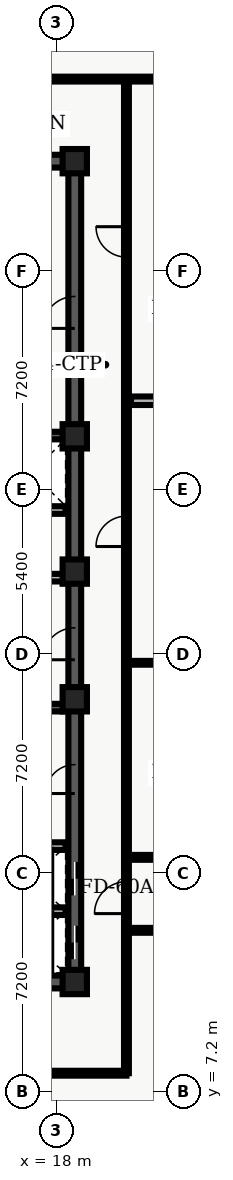
"""IFC4 building model, lengths in metres.
Left out: names, types, materials, properties, quantities, classifications, styles, units other than length and angle.
Written with IfcOpenShell. Run it as: python <this file> out.ifc"""

import sys

from ifc_helpers import new_model, entity, si_unit, converted_unit, direction, frame, origin_with_axes, origin_2d_with_axis, place, context, subcontext, project, spatial, polyline, rectangle, outline, extrude, element, fill, save


model = new_model("IFC4")
c1 = context("Model", 3, precision=1e-05, world=origin_with_axes(), true_north=direction((0.0, 1.0)))
c2 = subcontext(c1, "Body", "Model", "MODEL_VIEW")
j1 = project(units=[si_unit("LENGTHUNIT", "METRE"), converted_unit("PLANEANGLEUNIT", "DEGREE", entity("IfcPlaneAngleMeasure", 0.017), si_unit("PLANEANGLEUNIT", "RADIAN"), dimensions=[0, 0, 0, 0, 0, 0, 0])], contexts=[c1])
p1 = place(None, origin_with_axes())
s1 = spatial("IfcSite", under=j1, at=p1, CompositionType="ELEMENT")
p2 = place(p1, origin_with_axes())
s2 = spatial("IfcBuilding", under=s1, at=p2, CompositionType="ELEMENT")
p3 = place(p2, frame((0.0, 0.0, 260.7), z_axis=(0.0, 0.0, 1.0), x_axis=(1.0, 0.0, 0.0)))
s3 = spatial("IfcBuildingStorey", under=s2, at=p3, CompositionType="ELEMENT", Elevation=260.7)
p4 = place(p3, frame((11.4, 10.8, 0.0), z_axis=(0.0, 0.0, 1.0), x_axis=(1.0, 0.0, 0.0)))
e1 = element("IfcWall", 1, at=p4, inside=s3, PredefinedType="SHEAR", context=c2, shape_type="SweptSolid", body=[
    extrude(outline(polyline([(0.0, -0.21), (7.2, -0.21), (7.2, 0.21), (0.0, 0.21), (0.0, -0.21)])), origin_with_axes(), (0.0, 0.0, 1.0), 3.66),
])
p5 = place(p4, frame((2.625, 0.0, 0.0), z_axis=(0.0, 0.0, 1.0), x_axis=(1.0, 0.0, 0.0)))
e2 = element("IfcOpeningElement", 2, at=p5, cuts=e1, PredefinedType="OPENING", context=c2, shape_type="SweptSolid", body=[
    extrude(rectangle(XDim=1.05, YDim=0.44, at=origin_2d_with_axis()), origin_with_axes(), (0.0, 0.0, 1.0), 2.15),
])
p6 = place(p3, frame((11.4, 37.8, 0.0), z_axis=(0.0, 0.0, 1.0), x_axis=(1.0, 0.0, 0.0)))
e3 = element("IfcWall", 3, at=p6, inside=s3, PredefinedType="SHEAR", context=c2, shape_type="SweptSolid", body=[
    extrude(outline(polyline([(0.0, -0.21), (7.2, -0.21), (7.2, 0.21), (0.0, 0.21), (0.0, -0.21)])), origin_with_axes(), (0.0, 0.0, 1.0), 3.66),
])
p7 = place(p6, frame((2.625, 0.0, 0.0), z_axis=(0.0, 0.0, 1.0), x_axis=(1.0, 0.0, 0.0)))
e4 = element("IfcOpeningElement", 4, at=p7, cuts=e3, PredefinedType="OPENING", context=c2, shape_type="SweptSolid", body=[
    extrude(rectangle(XDim=1.05, YDim=0.44, at=origin_2d_with_axis()), origin_with_axes(), (0.0, 0.0, 1.0), 2.15),
])
p8 = place(p3, frame((18.6, 10.8, 0.0), z_axis=(0.0, 0.0, 1.0), x_axis=(0.0, 1.0, 0.0)))
e5 = element("IfcWall", 5, at=p8, inside=s3, PredefinedType="SHEAR", context=c2, shape_type="SweptSolid", body=[
    extrude(outline(polyline([(0.0, -0.21), (13.5, -0.21), (13.5, 0.21), (0.0, 0.21), (0.0, -0.21)])), origin_with_axes(), (0.0, 0.0, 1.0), 3.66),
])
p9 = place(p8, frame((1.3, 0.0, 0.0), z_axis=(0.0, 0.0, 1.0), x_axis=(1.0, 0.0, 0.0)))
e6 = element("IfcOpeningElement", 6, at=p9, cuts=e5, PredefinedType="OPENING", context=c2, shape_type="SweptSolid", body=[
    extrude(rectangle(XDim=1.1, YDim=0.44, at=origin_2d_with_axis()), origin_with_axes(), (0.0, 0.0, 1.0), 2.15),
])
p10 = place(p8, frame((3.4, 0.0, 0.0), z_axis=(0.0, 0.0, 1.0), x_axis=(1.0, 0.0, 0.0)))
e7 = element("IfcOpeningElement", 7, at=p10, cuts=e5, PredefinedType="OPENING", context=c2, shape_type="SweptSolid", body=[
    extrude(rectangle(XDim=1.1, YDim=0.44, at=origin_2d_with_axis()), origin_with_axes(), (0.0, 0.0, 1.0), 2.15),
])
p11 = place(p8, frame((11.125, 0.0, 0.0), z_axis=(0.0, 0.0, 1.0), x_axis=(1.0, 0.0, 0.0)))
e8 = element("IfcOpeningElement", 8, at=p11, cuts=e5, PredefinedType="OPENING", context=c2, shape_type="SweptSolid", body=[
    extrude(rectangle(XDim=1.05, YDim=0.44, at=origin_2d_with_axis()), origin_with_axes(), (0.0, 0.0, 1.0), 2.15),
])
p12 = place(p8, frame((6.675, 0.0, 0.0), z_axis=(0.0, 0.0, 1.0), x_axis=(1.0, 0.0, 0.0)))
e9 = element("IfcOpeningElement", 9, at=p12, cuts=e5, PredefinedType="OPENING", context=c2, shape_type="SweptSolid", body=[
    extrude(rectangle(XDim=0.95, YDim=0.44, at=origin_2d_with_axis()), origin_with_axes(), (0.0, 0.0, 1.0), 2.15),
])
p13 = place(p3, frame((18.6, 24.3, 0.0), z_axis=(0.0, 0.0, 1.0), x_axis=(0.0, 1.0, 0.0)))
e10 = element("IfcWall", 10, at=p13, inside=s3, PredefinedType="SHEAR", context=c2, shape_type="SweptSolid", body=[
    extrude(outline(polyline([(0.0, -0.21), (13.5, -0.21), (13.5, 0.21), (0.0, 0.21), (0.0, -0.21)])), origin_with_axes(), (0.0, 0.0, 1.0), 3.66),
])
p14 = place(p13, frame((8.525, 0.0, 0.0), z_axis=(0.0, 0.0, 1.0), x_axis=(1.0, 0.0, 0.0)))
e11 = element("IfcOpeningElement", 11, at=p14, cuts=e10, PredefinedType="OPENING", context=c2, shape_type="SweptSolid", body=[
    extrude(rectangle(XDim=1.05, YDim=0.44, at=origin_2d_with_axis()), origin_with_axes(), (0.0, 0.0, 1.0), 2.15),
])
for number, where, z_axis, x_axis in (
    (12, (11.61, 19.825, 0.0), (0.0, 0.0, 1.0), (1.0, 0.0, 0.0)),
    (13, (11.61, 28.775, 0.0), (0.0, 0.0, 1.0), (1.0, 0.0, 0.0)),
):
    element("IfcWall", number, at=place(p3, frame(where, z_axis=z_axis, x_axis=x_axis)), inside=s3, PredefinedType="SHEAR", context=c2, shape_type="SweptSolid", body=[
        extrude(outline(polyline([(0.0, -0.125), (6.78, -0.125), (6.78, 0.125), (0.0, 0.125), (0.0, -0.125)])), origin_with_axes(), (0.0, 0.0, 1.0), 3.66),
    ])
p15 = place(p3, frame((11.7, 24.1, 0.0), z_axis=(0.0, 0.0, 1.0), x_axis=(1.0, 0.0, 0.0)))
e14 = element("IfcWall", 14, at=p15, inside=s3, PredefinedType="SOLIDWALL", context=c2, shape_type="SweptSolid", body=[
    extrude(outline(polyline([(0.0, -0.125), (6.6, -0.125), (6.6, 0.125), (0.0, 0.125), (0.0, -0.125)])), origin_with_axes(), (0.0, 0.0, 1.0), 2.7),
])
p16 = place(p15, frame((3.75, 0.0, 0.0), z_axis=(0.0, 0.0, 1.0), x_axis=(1.0, 0.0, 0.0)))
e15 = element("IfcOpeningElement", 15, at=p16, cuts=e14, PredefinedType="OPENING", context=c2, shape_type="SweptSolid", body=[
    extrude(rectangle(XDim=0.9, YDim=0.27, at=origin_2d_with_axis()), origin_with_axes(), (0.0, 0.0, 1.0), 2.15),
])
p17 = place(p3, frame((11.7, 26.325, 0.0), z_axis=(0.0, 0.0, 1.0), x_axis=(1.0, 0.0, 0.0)))
e16 = element("IfcWall", 16, at=p17, inside=s3, PredefinedType="SOLIDWALL", context=c2, shape_type="SweptSolid", body=[
    extrude(outline(polyline([(0.0, -0.125), (6.6, -0.125), (6.6, 0.125), (0.0, 0.125), (0.0, -0.125)])), origin_with_axes(), (0.0, 0.0, 1.0), 2.7),
])
p18 = place(p17, frame((3.5, 0.0, 0.0), z_axis=(0.0, 0.0, 1.0), x_axis=(1.0, 0.0, 0.0)))
e17 = element("IfcOpeningElement", 17, at=p18, cuts=e16, PredefinedType="OPENING", context=c2, shape_type="SweptSolid", body=[
    extrude(rectangle(XDim=0.9, YDim=0.27, at=origin_2d_with_axis()), origin_with_axes(), (0.0, 0.0, 1.0), 2.15),
])
for number, where, z_axis, x_axis in (
    (18, (18.6, 10.8, 0.0), (0.0, 0.0, 1.0), (1.0, 0.0, 0.0)),
    (19, (18.6, 20.1, 0.0), (0.0, 0.0, 1.0), (1.0, 0.0, 0.0)),
    (20, (18.6, 24.3, 0.0), (0.0, 0.0, 1.0), (1.0, 0.0, 0.0)),
    (21, (18.6, 28.75, 0.0), (0.0, 0.0, 1.0), (1.0, 0.0, 0.0)),
    (22, (18.6, 37.8, 0.0), (0.0, 0.0, 1.0), (1.0, 0.0, 0.0)),
):
    element("IfcColumn", number, at=place(p3, frame(where, z_axis=z_axis, x_axis=x_axis)), inside=s3, PredefinedType="COLUMN", context=c2, shape_type="SweptSolid", body=[
        extrude(rectangle(XDim=0.8, YDim=0.8, at=origin_2d_with_axis()), origin_with_axes(), (0.0, 0.0, 1.0), 3.9),
    ])
for number, where, z_axis, x_axis in (
    (23, (15.84, 13.13, 0.0), (0.0, 0.0, 1.0), (1.0, 0.0, 0.0)),
    (24, (15.84, 15.27, 0.0), (0.0, 0.0, 1.0), (1.0, 0.0, 0.0)),
):
    element("IfcWall", number, at=place(p3, frame(where, z_axis=z_axis, x_axis=x_axis)), inside=s3, PredefinedType="SOLIDWALL", context=c2, shape_type="SweptSolid", body=[
        extrude(outline(polyline([(0.0, -0.125), (2.46, -0.125), (2.46, 0.125), (0.0, 0.125), (0.0, -0.125)])), origin_with_axes(), (0.0, 0.0, 1.0), 2.7),
    ])
p19 = place(p3, frame((8.135, 7.8, 0.0), z_axis=(0.0, 0.0, 1.0), x_axis=(1.0, 0.0, 0.0)))
e25 = element("IfcWall", 25, at=p19, inside=s3, PredefinedType="PARTITIONING", context=c2, shape_type="SweptSolid", body=[
    extrude(outline(polyline([(0.0, -0.08), (12.165, -0.08), (12.165, 0.08), (0.0, 0.08), (0.0, -0.08)])), origin_with_axes(), (0.0, 0.0, 1.0), 2.7),
])
p20 = place(p19, frame((3.979, 0.0, 0.0), z_axis=(0.0, 0.0, 1.0), x_axis=(1.0, 0.0, 0.0)))
e26 = element("IfcOpeningElement", 26, at=p20, cuts=e25, PredefinedType="OPENING", context=c2, shape_type="SweptSolid", body=[
    extrude(rectangle(XDim=1.0, YDim=0.18, at=origin_2d_with_axis()), origin_with_axes(), (0.0, 0.0, 1.0), 2.15),
])
p21 = place(p19, frame((8.778, 0.0, 0.0), z_axis=(0.0, 0.0, 1.0), x_axis=(1.0, 0.0, 0.0)))
e27 = element("IfcOpeningElement", 27, at=p21, cuts=e25, PredefinedType="OPENING", context=c2, shape_type="SweptSolid", body=[
    extrude(rectangle(XDim=1.0, YDim=0.18, at=origin_2d_with_axis()), origin_with_axes(), (0.0, 0.0, 1.0), 2.15),
])
p22 = place(p3, frame((8.135, 40.5, 0.0), z_axis=(0.0, 0.0, 1.0), x_axis=(1.0, 0.0, 0.0)))
e28 = element("IfcWall", 28, at=p22, inside=s3, PredefinedType="PARTITIONING", context=c2, shape_type="SweptSolid", body=[
    extrude(outline(polyline([(0.0, -0.08), (23.93, -0.08), (23.93, 0.08), (0.0, 0.08), (0.0, -0.08)])), origin_with_axes(), (0.0, 0.0, 1.0), 2.7),
])
p23 = place(p22, frame((0.76, 0.0, 0.0), z_axis=(0.0, 0.0, 1.0), x_axis=(1.0, 0.0, 0.0)))
e29 = element("IfcOpeningElement", 29, at=p23, cuts=e28, PredefinedType="OPENING", context=c2, shape_type="SweptSolid", body=[
    extrude(rectangle(XDim=1.0, YDim=0.18, at=origin_2d_with_axis()), origin_with_axes(), (0.0, 0.0, 1.0), 2.15),
])
p24 = place(p22, frame((7.625, 0.0, 0.0), z_axis=(0.0, 0.0, 1.0), x_axis=(1.0, 0.0, 0.0)))
e30 = element("IfcOpeningElement", 30, at=p24, cuts=e28, PredefinedType="OPENING", context=c2, shape_type="SweptSolid", body=[
    extrude(rectangle(XDim=1.0, YDim=0.18, at=origin_2d_with_axis()), origin_with_axes(), (0.0, 0.0, 1.0), 2.15),
])
p25 = place(p3, frame((20.3, 7.8, 0.0), z_axis=(0.0, 0.0, 1.0), x_axis=(0.0, 1.0, 0.0)))
e31 = element("IfcWall", 31, at=p25, inside=s3, PredefinedType="PARTITIONING", context=c2, shape_type="SweptSolid", body=[
    extrude(outline(polyline([(0.0, -0.08), (32.7, -0.08), (32.7, 0.08), (0.0, 0.08), (0.0, -0.08)])), origin_with_axes(), (0.0, 0.0, 1.0), 2.7),
])
p26 = place(p25, frame((17.825, 0.0, 0.0), z_axis=(0.0, 0.0, 1.0), x_axis=(1.0, 0.0, 0.0)))
e32 = element("IfcOpeningElement", 32, at=p26, cuts=e31, PredefinedType="OPENING", context=c2, shape_type="SweptSolid", body=[
    extrude(rectangle(XDim=1.0, YDim=0.18, at=origin_2d_with_axis()), origin_with_axes(), (0.0, 0.0, 1.0), 2.15),
])
p27 = place(p25, frame((27.345, 0.0, 0.0), z_axis=(0.0, 0.0, 1.0), x_axis=(1.0, 0.0, 0.0)))
e33 = element("IfcOpeningElement", 33, at=p27, cuts=e31, PredefinedType="OPENING", context=c2, shape_type="SweptSolid", body=[
    extrude(rectangle(XDim=1.0, YDim=0.18, at=origin_2d_with_axis()), origin_with_axes(), (0.0, 0.0, 1.0), 2.15),
])
p28 = place(p25, frame((5.775, 0.0, 0.0), z_axis=(0.0, 0.0, 1.0), x_axis=(1.0, 0.0, 0.0)))
e34 = element("IfcOpeningElement", 34, at=p28, cuts=e31, PredefinedType="OPENING", context=c2, shape_type="SweptSolid", body=[
    extrude(rectangle(XDim=1.05, YDim=0.18, at=origin_2d_with_axis()), origin_with_axes(), (0.0, 0.0, 1.0), 2.15),
])
p29 = place(p3, frame((20.45, 29.92, 0.0), z_axis=(0.0, 0.0, 1.0), x_axis=(1.0, 0.0, 0.0)))
e35 = element("IfcWall", 35, at=p29, inside=s3, PredefinedType="PARTITIONING", context=c2, shape_type="SweptSolid", body=[
    extrude(outline(polyline([(0.0, -0.14), (11.615, -0.14), (11.615, 0.14), (0.0, 0.14), (0.0, -0.14)])), origin_with_axes(), (0.0, 0.0, 1.0), 2.7),
])
p30 = place(p3, frame((20.3, 12.5, 0.0), z_axis=(0.0, 0.0, 1.0), x_axis=(1.0, 0.0, 0.0)))
e36 = element("IfcWall", 36, at=p30, inside=s3, PredefinedType="PARTITIONING", context=c2, shape_type="SweptSolid", body=[
    extrude(outline(polyline([(0.0, -0.08), (16.05, -0.08), (16.05, 0.08), (0.0, 0.08), (0.0, -0.08)])), origin_with_axes(), (0.0, 0.0, 1.0), 2.7),
])
p31 = place(p30, frame((3.662, 0.0, 0.0), z_axis=(0.0, 0.0, 1.0), x_axis=(1.0, 0.0, 0.0)))
e37 = element("IfcOpeningElement", 37, at=p31, cuts=e36, PredefinedType="OPENING", context=c2, shape_type="SweptSolid", body=[
    extrude(rectangle(XDim=1.0, YDim=0.18, at=origin_2d_with_axis()), origin_with_axes(), (0.0, 0.0, 1.0), 2.15),
])
p32 = place(p30, frame((11.557, 0.0, 0.0), z_axis=(0.0, 0.0, 1.0), x_axis=(1.0, 0.0, 0.0)))
e38 = element("IfcOpeningElement", 38, at=p32, cuts=e36, PredefinedType="OPENING", context=c2, shape_type="SweptSolid", body=[
    extrude(rectangle(XDim=1.0, YDim=0.18, at=origin_2d_with_axis()), origin_with_axes(), (0.0, 0.0, 1.0), 2.15),
])
p33 = place(p3, frame((20.3, 14.9, 0.0), z_axis=(0.0, 0.0, 1.0), x_axis=(1.0, 0.0, 0.0)))
e39 = element("IfcWall", 39, at=p33, inside=s3, PredefinedType="PARTITIONING", context=c2, shape_type="SweptSolid", body=[
    extrude(outline(polyline([(0.0, -0.08), (16.05, -0.08), (16.05, 0.08), (0.0, 0.08), (0.0, -0.08)])), origin_with_axes(), (0.0, 0.0, 1.0), 2.7),
])
p34 = place(p33, frame((3.759, 0.0, 0.0), z_axis=(0.0, 0.0, 1.0), x_axis=(1.0, 0.0, 0.0)))
e40 = element("IfcOpeningElement", 40, at=p34, cuts=e39, PredefinedType="OPENING", context=c2, shape_type="SweptSolid", body=[
    extrude(rectangle(XDim=1.0, YDim=0.18, at=origin_2d_with_axis()), origin_with_axes(), (0.0, 0.0, 1.0), 2.15),
])
p35 = place(p33, frame((11.654, 0.0, 0.0), z_axis=(0.0, 0.0, 1.0), x_axis=(1.0, 0.0, 0.0)))
e41 = element("IfcOpeningElement", 41, at=p35, cuts=e39, PredefinedType="OPENING", context=c2, shape_type="SweptSolid", body=[
    extrude(rectangle(XDim=1.0, YDim=0.18, at=origin_2d_with_axis()), origin_with_axes(), (0.0, 0.0, 1.0), 2.15),
])
p36 = place(p3, frame((20.3, 21.3, 0.0), z_axis=(0.0, 0.0, 1.0), x_axis=(1.0, 0.0, 0.0)))
e42 = element("IfcWall", 42, at=p36, inside=s3, PredefinedType="PARTITIONING", context=c2, shape_type="SweptSolid", body=[
    extrude(outline(polyline([(0.0, -0.062), (11.765, -0.062), (11.765, 0.062), (0.0, 0.062), (0.0, -0.062)])), origin_with_axes(), (0.0, 0.0, 1.0), 2.7),
])
p37 = place(p8, frame((1.3, 0.0, 0.0), z_axis=(0.0, 0.0, 1.0), x_axis=(1.0, 0.0, 0.0)))
e43 = element("IfcDoor", 43, at=p37, inside=s3, OperationType="SLIDING_TO_LEFT", PredefinedType="DOOR", context=c2, shape_type="SweptSolid", body=[
    extrude(rectangle(XDim=1.1, YDim=0.09, at=origin_2d_with_axis()), origin_with_axes(), (0.0, 0.0, 1.0), 2.15),
])
fill(e6, e43)
p38 = place(p8, frame((3.4, 0.0, 0.0), z_axis=(0.0, 0.0, 1.0), x_axis=(1.0, 0.0, 0.0)))
e44 = element("IfcDoor", 44, at=p38, inside=s3, OperationType="SLIDING_TO_RIGHT", PredefinedType="DOOR", context=c2, shape_type="SweptSolid", body=[
    extrude(rectangle(XDim=1.1, YDim=0.09, at=origin_2d_with_axis()), origin_with_axes(), (0.0, 0.0, 1.0), 2.15),
])
fill(e7, e44)
p39 = place(p8, frame((11.125, 0.0, 0.0), z_axis=(0.0, 0.0, 1.0), x_axis=(1.0, 0.0, 0.0)))
e45 = element("IfcDoor", 45, at=p39, inside=s3, OperationType="SINGLE_SWING_LEFT", PredefinedType="DOOR", context=c2, shape_type="SweptSolid", body=[
    extrude(rectangle(XDim=1.05, YDim=0.09, at=origin_2d_with_axis()), origin_with_axes(), (0.0, 0.0, 1.0), 2.15),
])
fill(e8, e45)
p40 = place(p8, frame((6.675, 0.0, 0.0), z_axis=(0.0, 0.0, 1.0), x_axis=(1.0, 0.0, 0.0)))
e46 = element("IfcDoor", 46, at=p40, inside=s3, OperationType="SINGLE_SWING_LEFT", PredefinedType="DOOR", context=c2, shape_type="SweptSolid", body=[
    extrude(rectangle(XDim=0.95, YDim=0.09, at=origin_2d_with_axis()), origin_with_axes(), (0.0, 0.0, 1.0), 2.15),
])
fill(e9, e46)
p41 = place(p13, frame((8.525, 0.0, 0.0), z_axis=(0.0, 0.0, 1.0), x_axis=(1.0, 0.0, 0.0)))
e47 = element("IfcDoor", 47, at=p41, inside=s3, OperationType="SINGLE_SWING_LEFT", PredefinedType="DOOR", context=c2, shape_type="SweptSolid", body=[
    extrude(rectangle(XDim=1.05, YDim=0.09, at=origin_2d_with_axis()), origin_with_axes(), (0.0, 0.0, 1.0), 2.15),
])
fill(e11, e47)
p42 = place(p25, frame((17.825, 0.0, 0.0), z_axis=(0.0, 0.0, 1.0), x_axis=(1.0, 0.0, 0.0)))
e48 = element("IfcDoor", 48, at=p42, inside=s3, OperationType="SINGLE_SWING_LEFT", PredefinedType="DOOR", context=c2, shape_type="SweptSolid", body=[
    extrude(rectangle(XDim=1.0, YDim=0.09, at=origin_2d_with_axis()), origin_with_axes(), (0.0, 0.0, 1.0), 2.15),
])
fill(e32, e48)
p43 = place(p25, frame((27.345, 0.0, 0.0), z_axis=(0.0, 0.0, 1.0), x_axis=(1.0, 0.0, 0.0)))
e49 = element("IfcDoor", 49, at=p43, inside=s3, OperationType="SINGLE_SWING_RIGHT", PredefinedType="DOOR", context=c2, shape_type="SweptSolid", body=[
    extrude(rectangle(XDim=1.0, YDim=0.09, at=origin_2d_with_axis()), origin_with_axes(), (0.0, 0.0, 1.0), 2.15),
])
fill(e33, e49)
p44 = place(p25, frame((5.775, 0.0, 0.0), z_axis=(0.0, 0.0, 1.0), x_axis=(1.0, 0.0, 0.0)))
e50 = element("IfcDoor", 50, at=p44, inside=s3, OperationType="SINGLE_SWING_LEFT", PredefinedType="DOOR", context=c2, shape_type="SweptSolid", body=[
    extrude(rectangle(XDim=1.05, YDim=0.09, at=origin_2d_with_axis()), origin_with_axes(), (0.0, 0.0, 1.0), 2.15),
])
fill(e34, e50)
save(model, sys.argv[1])
